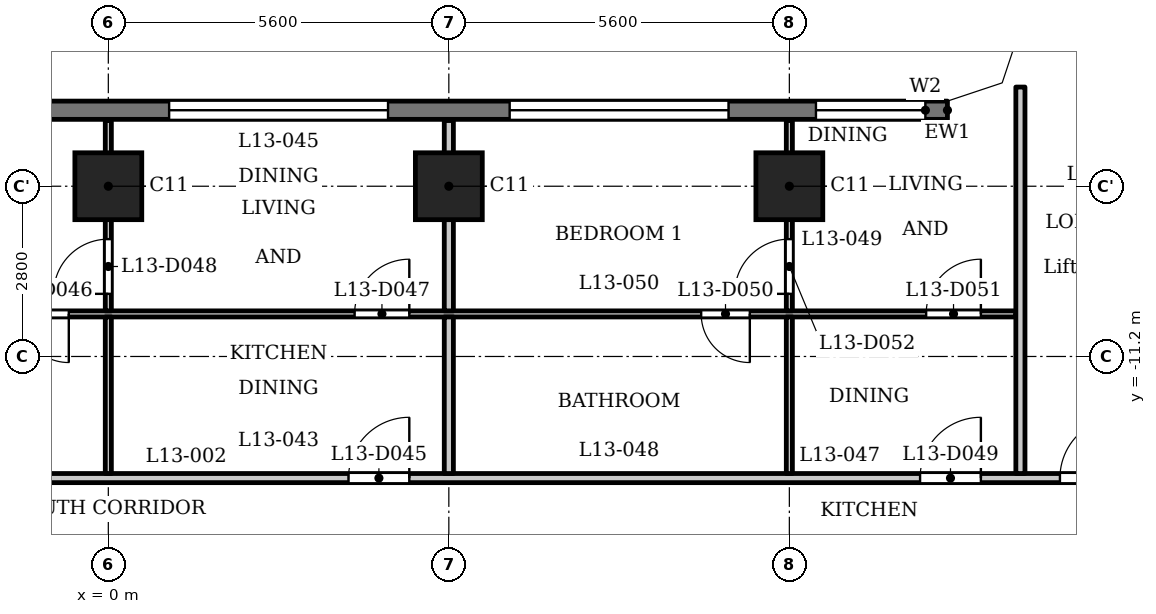
"""IFC4 building model, lengths in metres.
Left out: names, types, materials, properties, quantities, classifications, styles, units other than length and angle.
Written with IfcOpenShell. Run it as: python <this file> out.ifc"""

import sys

from ifc_helpers import new_model, si_unit, direction, frame, frame_2d, origin, origin_2d, place, context, subcontext, project, spatial, polyline, rectangle, outline, extrude, element, fill, save


model = new_model("IFC4")
c1 = context("Model", 3, precision=1e-05, world=origin(), true_north=direction((0.0, 1.0)))
c2 = subcontext(c1, "Body", "Model", "MODEL_VIEW")
j1 = project(units=[si_unit("LENGTHUNIT", "METRE"), si_unit("PLANEANGLEUNIT", "RADIAN")], contexts=[c1])
p1 = place(None, origin())
s1 = spatial("IfcSite", under=j1, at=p1, CompositionType="ELEMENT")
p2 = place(p1, origin())
s2 = spatial("IfcBuilding", under=s1, at=p2, CompositionType="ELEMENT")
p3 = place(p2, frame((0.0, 0.0, 55.0)))
s3 = spatial("IfcBuildingStorey", under=s2, at=p3, CompositionType="ELEMENT", Elevation=55.0)
for number, where, z_axis, x_axis in (
    (1, (0.0, -8.4, 0.0), (0.0, 0.0, 1.0), (1.0, 0.0, 0.0)),
    (2, (5.6, -8.4, 0.0), (0.0, 0.0, 1.0), (1.0, 0.0, 0.0)),
    (3, (11.2, -8.4, 0.0), (0.0, 0.0, 1.0), (1.0, 0.0, 0.0)),
):
    element("IfcColumn", number, at=place(p3, frame(where, z_axis=z_axis, x_axis=x_axis)), inside=s3, PredefinedType="COLUMN", context=c2, shape_type="SweptSolid", body=[
        extrude(rectangle(XDim=1.1, YDim=1.1, at=origin_2d()), origin(), (0.0, 0.0, 1.0), 3.5),
    ])
p4 = place(p3, frame((13.8, -7.15, 0.0), z_axis=(0.0, 0.0, 1.0), x_axis=(-1.0, 0.0, 0.0)))
e4 = element("IfcWall", 4, at=p4, inside=s3, PredefinedType="SOLIDWALL", context=c2, shape_type="SweptSolid", body=[
    extrude(rectangle(XDim=27.6, YDim=0.3, at=frame_2d((13.8, 0.0))), origin(), (0.0, 0.0, 1.0), 3.2),
])
p5 = place(p4, frame((0.363, 0.0, 0.9)))
e5 = element("IfcOpeningElement", 5, at=p5, cuts=e4, PredefinedType="OPENING", context=c2, shape_type="SweptSolid", body=[
    extrude(rectangle(XDim=1.8, YDim=1.25, at=frame_2d((0.9, 0.625))), frame((0.0, 0.16, 0.0), z_axis=(0.0, -1.0, 0.0), x_axis=(1.0, 0.0, 0.0)), (0.0, 0.0, 1.0), 0.32),
])
p6 = place(p4, frame((3.6, 0.0, 1.2)))
e6 = element("IfcOpeningElement", 6, at=p6, cuts=e4, PredefinedType="OPENING", context=c2, shape_type="SweptSolid", body=[
    extrude(rectangle(XDim=3.6, YDim=0.95, at=frame_2d((1.8, 0.475))), frame((0.0, 0.16, 0.0), z_axis=(0.0, -1.0, 0.0), x_axis=(1.0, 0.0, 0.0)), (0.0, 0.0, 1.0), 0.32),
])
p7 = place(p4, frame((9.2, 0.0, 1.2)))
e7 = element("IfcOpeningElement", 7, at=p7, cuts=e4, PredefinedType="OPENING", context=c2, shape_type="SweptSolid", body=[
    extrude(rectangle(XDim=3.6, YDim=0.95, at=frame_2d((1.8, 0.475))), frame((0.0, 0.16, 0.0), z_axis=(0.0, -1.0, 0.0), x_axis=(1.0, 0.0, 0.0)), (0.0, 0.0, 1.0), 0.32),
])
p8 = place(p4, frame((14.8, 0.0, 1.2)))
e8 = element("IfcOpeningElement", 8, at=p8, cuts=e4, PredefinedType="OPENING", context=c2, shape_type="SweptSolid", body=[
    extrude(rectangle(XDim=3.6, YDim=0.95, at=frame_2d((1.8, 0.475))), frame((0.0, 0.16, 0.0), z_axis=(0.0, -1.0, 0.0), x_axis=(1.0, 0.0, 0.0)), (0.0, 0.0, 1.0), 0.32),
])
p9 = place(p4, frame((20.4, 0.0, 1.2)))
e9 = element("IfcOpeningElement", 9, at=p9, cuts=e4, PredefinedType="OPENING", context=c2, shape_type="SweptSolid", body=[
    extrude(rectangle(XDim=3.6, YDim=0.95, at=frame_2d((1.8, 0.475))), frame((0.0, 0.16, 0.0), z_axis=(0.0, -1.0, 0.0), x_axis=(1.0, 0.0, 0.0)), (0.0, 0.0, 1.0), 0.32),
])
p10 = place(p4, frame((25.438, 0.0, 0.9)))
e10 = element("IfcOpeningElement", 10, at=p10, cuts=e4, PredefinedType="OPENING", context=c2, shape_type="SweptSolid", body=[
    extrude(rectangle(XDim=1.8, YDim=1.25, at=frame_2d((0.9, 0.625))), frame((0.0, 0.16, 0.0), z_axis=(0.0, -1.0, 0.0), x_axis=(1.0, 0.0, 0.0)), (0.0, 0.0, 1.0), 0.32),
])
p11 = place(p3, frame((-17.4, -13.2, 0.0), z_axis=(0.0, 0.0, 1.0), x_axis=(1.0, 0.0, 0.0)))
e11 = element("IfcWall", 11, at=p11, inside=s3, PredefinedType="PARTITIONING", context=c2, shape_type="SweptSolid", body=[
    extrude(rectangle(XDim=34.8, YDim=0.15, at=frame_2d((17.4, 0.0))), origin(), (0.0, 0.0, 1.0), 3.2),
])
p12 = place(p11, frame((0.65, 0.0, 0.0)))
e12 = element("IfcOpeningElement", 12, at=p12, cuts=e11, PredefinedType="OPENING", context=c2, shape_type="SweptSolid", body=[
    extrude(rectangle(XDim=1.0, YDim=2.1, at=frame_2d((0.5, 1.05))), frame((0.0, 0.085, 0.0), z_axis=(0.0, -1.0, 0.0), x_axis=(1.0, 0.0, 0.0)), (0.0, 0.0, 1.0), 0.17),
])
p13 = place(p11, frame((33.05, 0.0, 0.0)))
e13 = element("IfcOpeningElement", 13, at=p13, cuts=e11, PredefinedType="OPENING", context=c2, shape_type="SweptSolid", body=[
    extrude(rectangle(XDim=1.0, YDim=2.1, at=frame_2d((0.5, 1.05))), frame((0.0, 0.085, 0.0), z_axis=(0.0, -1.0, 0.0), x_axis=(1.0, 0.0, 0.0)), (0.0, 0.0, 1.0), 0.17),
])
p14 = place(p11, frame((10.15, 0.0, 0.0)))
e14 = element("IfcOpeningElement", 14, at=p14, cuts=e11, PredefinedType="OPENING", context=c2, shape_type="SweptSolid", body=[
    extrude(rectangle(XDim=1.0, YDim=2.1, at=frame_2d((0.5, 1.05))), frame((0.0, 0.085, 0.0), z_axis=(0.0, -1.0, 0.0), x_axis=(1.0, 0.0, 0.0)), (0.0, 0.0, 1.0), 0.17),
])
p15 = place(p11, frame((21.35, 0.0, 0.0)))
e15 = element("IfcOpeningElement", 15, at=p15, cuts=e11, PredefinedType="OPENING", context=c2, shape_type="SweptSolid", body=[
    extrude(rectangle(XDim=1.0, YDim=2.1, at=frame_2d((0.5, 1.05))), frame((0.0, 0.085, 0.0), z_axis=(0.0, -1.0, 0.0), x_axis=(1.0, 0.0, 0.0)), (0.0, 0.0, 1.0), 0.17),
])
p16 = place(p11, frame((30.75, 0.0, 0.0)))
e16 = element("IfcOpeningElement", 16, at=p16, cuts=e11, PredefinedType="OPENING", context=c2, shape_type="SweptSolid", body=[
    extrude(rectangle(XDim=1.0, YDim=2.1, at=frame_2d((0.5, 1.05))), frame((0.0, 0.085, 0.0), z_axis=(0.0, -1.0, 0.0), x_axis=(1.0, 0.0, 0.0)), (0.0, 0.0, 1.0), 0.17),
])
p17 = place(p3, frame((-14.925, -10.5, 0.0), z_axis=(0.0, 0.0, 1.0), x_axis=(1.0, 0.0, 0.0)))
e17 = element("IfcWall", 17, at=p17, inside=s3, PredefinedType="PARTITIONING", context=c2, shape_type="SweptSolid", body=[
    extrude(rectangle(XDim=29.85, YDim=0.1, at=frame_2d((14.925, 0.0))), origin(), (0.0, 0.0, 1.0), 3.2),
])
p18 = place(p17, frame((2.325, 0.0, 0.0)))
e18 = element("IfcOpeningElement", 18, at=p18, cuts=e17, PredefinedType="OPENING", context=c2, shape_type="SweptSolid", body=[
    extrude(rectangle(XDim=0.8, YDim=2.1, at=frame_2d((0.4, 1.05))), frame((0.0, 0.06, 0.0), z_axis=(0.0, -1.0, 0.0), x_axis=(1.0, 0.0, 0.0)), (0.0, 0.0, 1.0), 0.12),
])
p19 = place(p17, frame((7.775, 0.0, 0.0)))
e19 = element("IfcOpeningElement", 19, at=p19, cuts=e17, PredefinedType="OPENING", context=c2, shape_type="SweptSolid", body=[
    extrude(rectangle(XDim=0.9, YDim=2.1, at=frame_2d((0.45, 1.05))), frame((0.0, 0.06, 0.0), z_axis=(0.0, -1.0, 0.0), x_axis=(1.0, 0.0, 0.0)), (0.0, 0.0, 1.0), 0.12),
])
p20 = place(p17, frame((13.475, 0.0, 0.0)))
e20 = element("IfcOpeningElement", 20, at=p20, cuts=e17, PredefinedType="OPENING", context=c2, shape_type="SweptSolid", body=[
    extrude(rectangle(XDim=0.8, YDim=2.1, at=frame_2d((0.4, 1.05))), frame((0.0, 0.06, 0.0), z_axis=(0.0, -1.0, 0.0), x_axis=(1.0, 0.0, 0.0)), (0.0, 0.0, 1.0), 0.12),
])
p21 = place(p17, frame((18.975, 0.0, 0.0)))
e21 = element("IfcOpeningElement", 21, at=p21, cuts=e17, PredefinedType="OPENING", context=c2, shape_type="SweptSolid", body=[
    extrude(rectangle(XDim=0.9, YDim=2.1, at=frame_2d((0.45, 1.05))), frame((0.0, 0.06, 0.0), z_axis=(0.0, -1.0, 0.0), x_axis=(1.0, 0.0, 0.0)), (0.0, 0.0, 1.0), 0.12),
])
p22 = place(p17, frame((24.675, 0.0, 0.0)))
e22 = element("IfcOpeningElement", 22, at=p22, cuts=e17, PredefinedType="OPENING", context=c2, shape_type="SweptSolid", body=[
    extrude(rectangle(XDim=0.8, YDim=2.1, at=frame_2d((0.4, 1.05))), frame((0.0, 0.06, 0.0), z_axis=(0.0, -1.0, 0.0), x_axis=(1.0, 0.0, 0.0)), (0.0, 0.0, 1.0), 0.12),
])
p23 = place(p17, frame((28.375, 0.0, 0.0)))
e23 = element("IfcOpeningElement", 23, at=p23, cuts=e17, PredefinedType="OPENING", context=c2, shape_type="SweptSolid", body=[
    extrude(rectangle(XDim=0.9, YDim=2.1, at=frame_2d((0.45, 1.05))), frame((0.0, 0.06, 0.0), z_axis=(0.0, -1.0, 0.0), x_axis=(1.0, 0.0, 0.0)), (0.0, 0.0, 1.0), 0.12),
])
p24 = place(p3, frame((0.0, -13.125, 0.0), z_axis=(0.0, 0.0, 1.0), x_axis=(0.0, 1.0, 0.0)))
e24 = element("IfcWall", 24, at=p24, inside=s3, PredefinedType="PARTITIONING", context=c2, shape_type="SweptSolid", body=[
    extrude(rectangle(XDim=2.575, YDim=0.1, at=frame_2d((1.288, 0.0))), origin(), (0.0, 0.0, 1.0), 3.2),
])
p25 = place(p3, frame((0.0, -10.45, 0.0), z_axis=(0.0, 0.0, 1.0), x_axis=(0.0, 1.0, 0.0)))
e25 = element("IfcWall", 25, at=p25, inside=s3, PredefinedType="PARTITIONING", context=c2, shape_type="SweptSolid", body=[
    extrude(rectangle(XDim=3.13, YDim=0.1, at=frame_2d((1.565, 0.0))), origin(), (0.0, 0.0, 1.0), 3.2),
])
p26 = place(p25, frame((0.28, 0.0, 0.0)))
e26 = element("IfcOpeningElement", 26, at=p26, cuts=e25, PredefinedType="OPENING", context=c2, shape_type="SweptSolid", body=[
    extrude(rectangle(XDim=0.9, YDim=2.1, at=frame_2d((0.45, 1.05))), frame((0.0, 0.06, 0.0), z_axis=(0.0, -1.0, 0.0), x_axis=(1.0, 0.0, 0.0)), (0.0, 0.0, 1.0), 0.12),
])
p27 = place(p3, frame((5.6, -13.125, 0.0), z_axis=(0.0, 0.0, 1.0), x_axis=(0.0, 1.0, 0.0)))
e27 = element("IfcWall", 27, at=p27, inside=s3, PredefinedType="PARTITIONING", context=c2, shape_type="SweptSolid", body=[
    extrude(rectangle(XDim=2.575, YDim=0.15, at=frame_2d((1.288, 0.0))), origin(), (0.0, 0.0, 1.0), 3.2),
])
p28 = place(p3, frame((5.6, -10.45, 0.0), z_axis=(0.0, 0.0, 1.0), x_axis=(0.0, 1.0, 0.0)))
e28 = element("IfcWall", 28, at=p28, inside=s3, PredefinedType="PARTITIONING", context=c2, shape_type="SweptSolid", body=[
    extrude(rectangle(XDim=3.13, YDim=0.15, at=frame_2d((1.565, 0.0))), origin(), (0.0, 0.0, 1.0), 3.2),
])
p29 = place(p3, frame((11.2, -13.125, 0.0), z_axis=(0.0, 0.0, 1.0), x_axis=(0.0, 1.0, 0.0)))
e29 = element("IfcWall", 29, at=p29, inside=s3, PredefinedType="PARTITIONING", context=c2, shape_type="SweptSolid", body=[
    extrude(rectangle(XDim=2.575, YDim=0.1, at=frame_2d((1.288, 0.0))), origin(), (0.0, 0.0, 1.0), 3.2),
])
p30 = place(p3, frame((11.2, -10.45, 0.0), z_axis=(0.0, 0.0, 1.0), x_axis=(0.0, 1.0, 0.0)))
e30 = element("IfcWall", 30, at=p30, inside=s3, PredefinedType="PARTITIONING", context=c2, shape_type="SweptSolid", body=[
    extrude(rectangle(XDim=3.13, YDim=0.1, at=frame_2d((1.565, 0.0))), origin(), (0.0, 0.0, 1.0), 3.2),
])
p31 = place(p30, frame((0.28, 0.0, 0.0)))
e31 = element("IfcOpeningElement", 31, at=p31, cuts=e30, PredefinedType="OPENING", context=c2, shape_type="SweptSolid", body=[
    extrude(rectangle(XDim=0.9, YDim=2.1, at=frame_2d((0.45, 1.05))), frame((0.0, 0.06, 0.0), z_axis=(0.0, -1.0, 0.0), x_axis=(1.0, 0.0, 0.0)), (0.0, 0.0, 1.0), 0.12),
])
p32 = place(p3, frame((15.0, -13.125, 0.0), z_axis=(0.0, 0.0, 1.0), x_axis=(0.0, 1.0, 0.0)))
e32 = element("IfcWall", 32, at=p32, inside=s3, PredefinedType="PARTITIONING", context=c2, shape_type="SweptSolid", body=[
    extrude(rectangle(XDim=6.356, YDim=0.15, at=frame_2d((3.178, 0.0))), origin(), (0.0, 0.0, 1.0), 3.2),
])
p33 = place(p3, origin())
e33 = element("IfcWall", 33, at=p33, inside=s3, PredefinedType="SOLIDWALL", context=c2, shape_type="SweptSolid", body=[
    extrude(outline(polyline([(14.937, -6.937), (15.3, -5.849), (15.3, -5.8), (15.0, -5.8), (14.7, -6.7), (13.8, -7.0), (13.8, -7.3), (13.849, -7.3), (14.937, -6.937)])), origin(), (0.0, 0.0, 1.0), 3.2),
])
p34 = place(p13, origin())
e34 = element("IfcDoor", 34, at=p34, inside=s3, OperationType="SINGLE_SWING_LEFT", PredefinedType="DOOR", context=c2, shape_type="SweptSolid", body=[
    extrude(rectangle(XDim=1.0, YDim=2.1, at=frame_2d((0.5, 1.05))), frame((0.0, 0.025, 0.0), z_axis=(0.0, -1.0, 0.0), x_axis=(1.0, 0.0, 0.0)), (0.0, 0.0, 1.0), 0.05),
])
fill(e13, e34)
p35 = place(p15, origin())
e35 = element("IfcDoor", 35, at=p35, inside=s3, OperationType="SINGLE_SWING_LEFT", PredefinedType="DOOR", context=c2, shape_type="SweptSolid", body=[
    extrude(rectangle(XDim=1.0, YDim=2.1, at=frame_2d((0.5, 1.05))), frame((0.0, 0.025, 0.0), z_axis=(0.0, -1.0, 0.0), x_axis=(1.0, 0.0, 0.0)), (0.0, 0.0, 1.0), 0.05),
])
fill(e15, e35)
p36 = place(p20, origin())
e36 = element("IfcDoor", 36, at=p36, inside=s3, OperationType="SINGLE_SWING_RIGHT", PredefinedType="DOOR", context=c2, shape_type="SweptSolid", body=[
    extrude(rectangle(XDim=0.8, YDim=2.1, at=frame_2d((0.4, 1.05))), frame((0.0, 0.025, 0.0), z_axis=(0.0, -1.0, 0.0), x_axis=(1.0, 0.0, 0.0)), (0.0, 0.0, 1.0), 0.05),
])
fill(e20, e36)
p37 = place(p21, origin())
e37 = element("IfcDoor", 37, at=p37, inside=s3, OperationType="SINGLE_SWING_LEFT", PredefinedType="DOOR", context=c2, shape_type="SweptSolid", body=[
    extrude(rectangle(XDim=0.9, YDim=2.1, at=frame_2d((0.45, 1.05))), frame((0.0, 0.025, 0.0), z_axis=(0.0, -1.0, 0.0), x_axis=(1.0, 0.0, 0.0)), (0.0, 0.0, 1.0), 0.05),
])
fill(e21, e37)
p38 = place(p26, origin())
e38 = element("IfcDoor", 38, at=p38, inside=s3, OperationType="SINGLE_SWING_RIGHT", PredefinedType="DOOR", context=c2, shape_type="SweptSolid", body=[
    extrude(rectangle(XDim=0.9, YDim=2.1, at=frame_2d((0.45, 1.05))), frame((0.0, 0.025, 0.0), z_axis=(0.0, -1.0, 0.0), x_axis=(1.0, 0.0, 0.0)), (0.0, 0.0, 1.0), 0.05),
])
fill(e26, e38)
p39 = place(p16, origin())
e39 = element("IfcDoor", 39, at=p39, inside=s3, OperationType="SINGLE_SWING_LEFT", PredefinedType="DOOR", context=c2, shape_type="SweptSolid", body=[
    extrude(rectangle(XDim=1.0, YDim=2.1, at=frame_2d((0.5, 1.05))), frame((0.0, 0.025, 0.0), z_axis=(0.0, -1.0, 0.0), x_axis=(1.0, 0.0, 0.0)), (0.0, 0.0, 1.0), 0.05),
])
fill(e16, e39)
p40 = place(p22, origin())
e40 = element("IfcDoor", 40, at=p40, inside=s3, OperationType="SINGLE_SWING_RIGHT", PredefinedType="DOOR", context=c2, shape_type="SweptSolid", body=[
    extrude(rectangle(XDim=0.8, YDim=2.1, at=frame_2d((0.4, 1.05))), frame((0.0, 0.025, 0.0), z_axis=(0.0, -1.0, 0.0), x_axis=(1.0, 0.0, 0.0)), (0.0, 0.0, 1.0), 0.05),
])
fill(e22, e40)
p41 = place(p23, origin())
e41 = element("IfcDoor", 41, at=p41, inside=s3, OperationType="SINGLE_SWING_LEFT", PredefinedType="DOOR", context=c2, shape_type="SweptSolid", body=[
    extrude(rectangle(XDim=0.9, YDim=2.1, at=frame_2d((0.45, 1.05))), frame((0.0, 0.025, 0.0), z_axis=(0.0, -1.0, 0.0), x_axis=(1.0, 0.0, 0.0)), (0.0, 0.0, 1.0), 0.05),
])
fill(e23, e41)
p42 = place(p31, origin())
e42 = element("IfcDoor", 42, at=p42, inside=s3, OperationType="SINGLE_SWING_RIGHT", PredefinedType="DOOR", context=c2, shape_type="SweptSolid", body=[
    extrude(rectangle(XDim=0.9, YDim=2.1, at=frame_2d((0.45, 1.05))), frame((0.0, 0.025, 0.0), z_axis=(0.0, -1.0, 0.0), x_axis=(1.0, 0.0, 0.0)), (0.0, 0.0, 1.0), 0.05),
])
fill(e31, e42)
p43 = place(p5, origin())
e43 = element("IfcWindow", 43, at=p43, inside=s3, PartitioningType="SINGLE_PANEL", PredefinedType="WINDOW", context=c2, shape_type="SweptSolid", body=[
    extrude(rectangle(XDim=1.8, YDim=1.25, at=frame_2d((0.9, 0.625))), frame((0.0, 0.03, 0.0), z_axis=(0.0, -1.0, 0.0), x_axis=(1.0, 0.0, 0.0)), (0.0, 0.0, 1.0), 0.06),
])
fill(e5, e43)
p44 = place(p6, origin())
e44 = element("IfcWindow", 44, at=p44, inside=s3, PartitioningType="SINGLE_PANEL", PredefinedType="WINDOW", context=c2, shape_type="SweptSolid", body=[
    extrude(rectangle(XDim=3.6, YDim=0.95, at=frame_2d((1.8, 0.475))), frame((0.0, 0.03, 0.0), z_axis=(0.0, -1.0, 0.0), x_axis=(1.0, 0.0, 0.0)), (0.0, 0.0, 1.0), 0.06),
])
fill(e6, e44)
p45 = place(p7, origin())
e45 = element("IfcWindow", 45, at=p45, inside=s3, PartitioningType="SINGLE_PANEL", PredefinedType="WINDOW", context=c2, shape_type="SweptSolid", body=[
    extrude(rectangle(XDim=3.6, YDim=0.95, at=frame_2d((1.8, 0.475))), frame((0.0, 0.03, 0.0), z_axis=(0.0, -1.0, 0.0), x_axis=(1.0, 0.0, 0.0)), (0.0, 0.0, 1.0), 0.06),
])
fill(e7, e45)
save(model, sys.argv[1])
